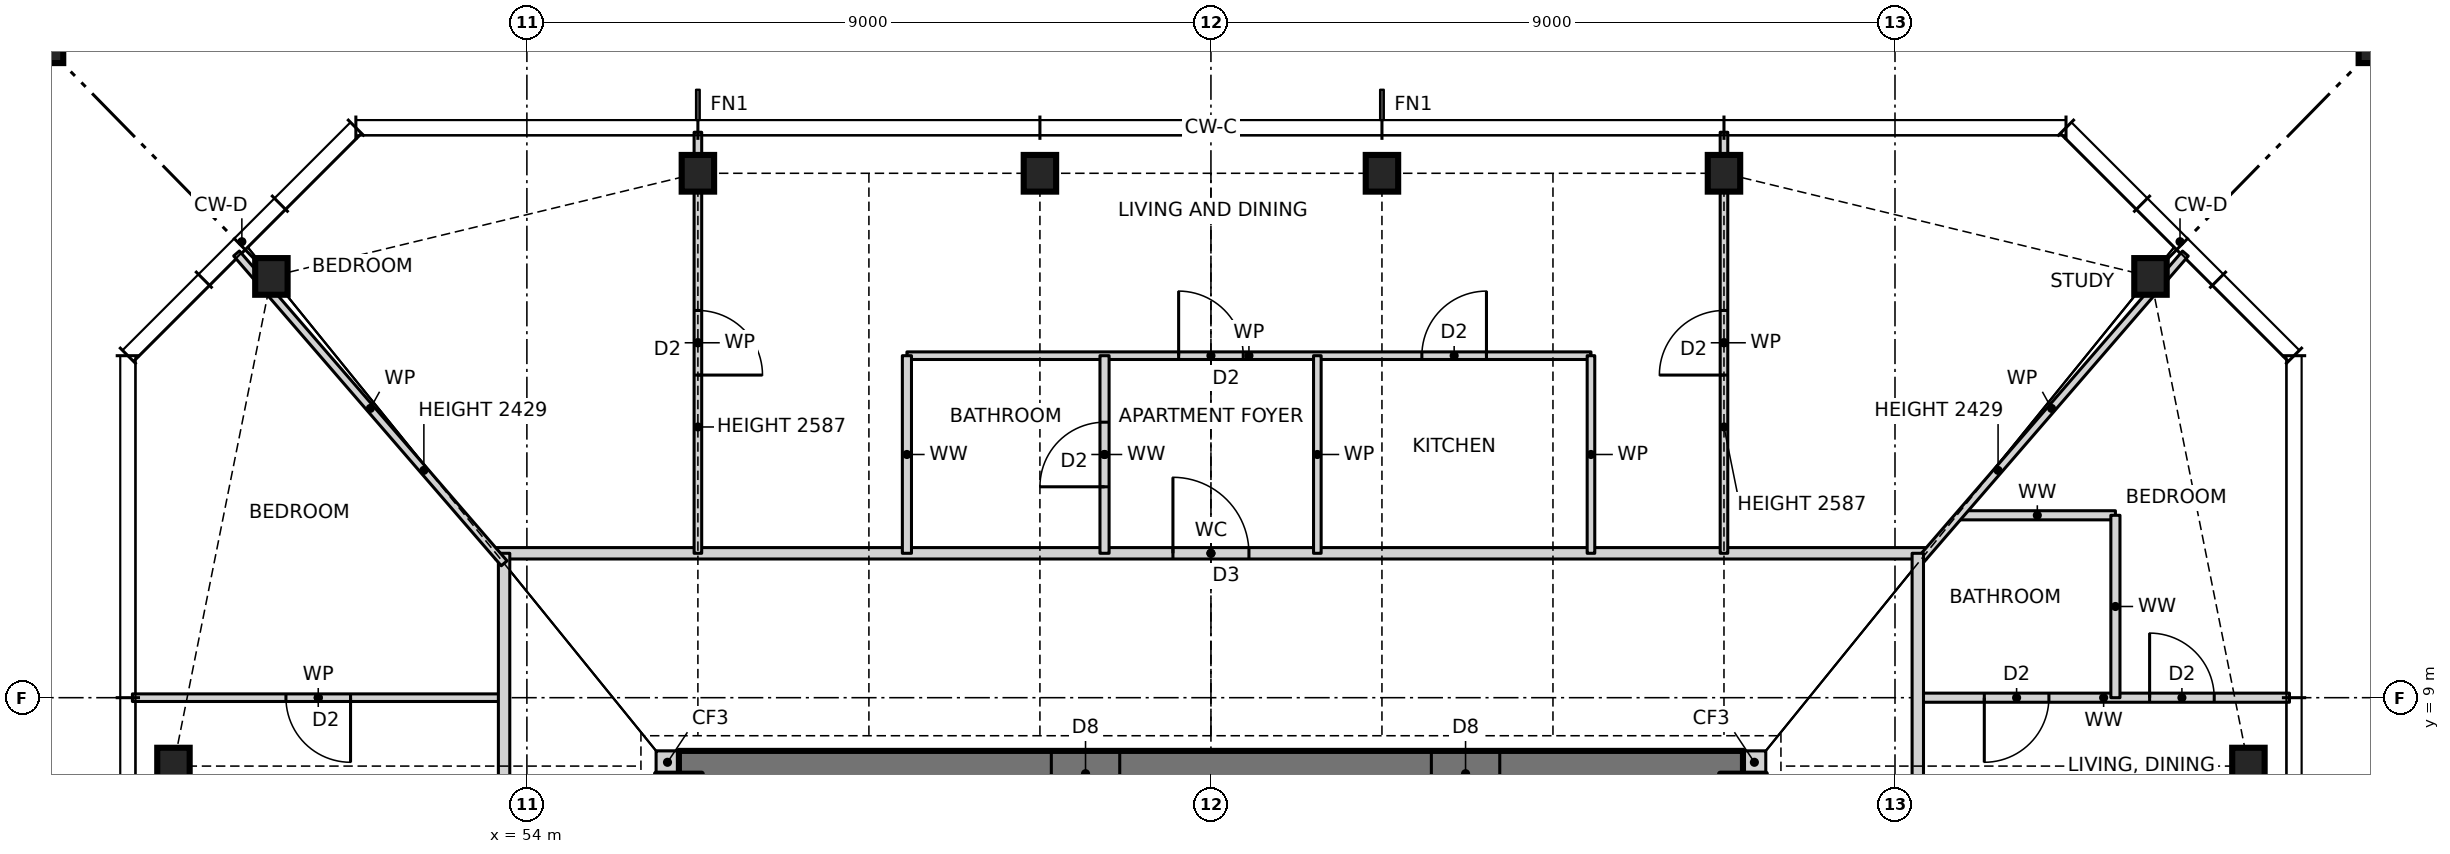
"""IFC4 building model, lengths in metres.
Left out: names, types, materials, properties, quantities, classifications, styles, units other than length and angle.
Written with IfcOpenShell. Run it as: python <this file> out.ifc"""

import sys

from ifc_helpers import new_model, si_unit, direction, frame, frame_2d, origin, origin_2d, place, context, subcontext, project, spatial, rectangle, hollow_rectangle, i_section, extrude, element, fill, save


model = new_model("IFC4")
c1 = context("Model", 3, precision=1e-05, world=origin(), true_north=direction((0.0, 1.0)))
c2 = subcontext(c1, "Body", "Model", "MODEL_VIEW")
j1 = project(units=[si_unit("LENGTHUNIT", "METRE"), si_unit("PLANEANGLEUNIT", "RADIAN")], contexts=[c1])
p1 = place(None, origin())
s1 = spatial("IfcSite", under=j1, at=p1, CompositionType="ELEMENT")
p2 = place(p1, origin())
s2 = spatial("IfcBuilding", under=s1, at=p2, CompositionType="ELEMENT")
p3 = place(p2, frame((0.0, 0.0, 105.0)))
s3 = spatial("IfcBuildingStorey", under=s2, at=p3, CompositionType="ELEMENT", Elevation=105.0)
for number, where, z_axis, x_axis in (
    (1, (76.65, 8.1, 0.0), (0.0, 0.0, 1.0), (1.0, 0.0, 0.0)),
    (2, (75.361, 14.543, 0.0), (0.0, 0.0, 1.0), (1.0, 0.0, 0.0)),
    (3, (69.75, 15.9, 0.0), (0.0, 0.0, 1.0), (1.0, 0.0, 0.0)),
    (4, (65.25, 15.9, 0.0), (0.0, 0.0, 1.0), (1.0, 0.0, 0.0)),
    (5, (60.75, 15.9, 0.0), (0.0, 0.0, 1.0), (1.0, 0.0, 0.0)),
    (6, (56.25, 15.9, 0.0), (0.0, 0.0, 1.0), (1.0, 0.0, 0.0)),
    (7, (50.639, 14.543, 0.0), (0.0, 0.0, 1.0), (1.0, 0.0, 0.0)),
    (8, (49.35, 8.1, 0.0), (0.0, 0.0, 1.0), (1.0, 0.0, 0.0)),
):
    element("IfcColumn", number, at=place(p3, frame(where, z_axis=z_axis, x_axis=x_axis)), inside=s3, PredefinedType="COLUMN", context=c2, shape_type="SweptSolid", body=[
        extrude(i_section(OverallWidth=0.427, OverallDepth=0.483, WebThickness=0.051, FlangeThickness=0.082, at=origin_2d()), origin(), (0.0, 0.0, 1.0), 3.5),
    ])
for number, where, z_axis, x_axis in (
    (9, (78.65, 17.9, 0.0), (0.0, 0.0, 1.0), (1.0, 0.0, 0.0)),
    (10, (47.35, 17.9, 0.0), (0.0, 0.0, 1.0), (1.0, 0.0, 0.0)),
):
    element("IfcColumn", number, at=place(p3, frame(where, z_axis=z_axis, x_axis=x_axis)), inside=s3, PredefinedType="COLUMN", context=c2, shape_type="SweptSolid", body=[
        extrude(hollow_rectangle(XDim=1.1, YDim=1.1, WallThickness=0.06, at=origin_2d()), origin(), (0.0, 0.0, 1.0), 3.5),
    ])
for number, where, z_axis, x_axis in (
    (11, (70.0, 8.15, 0.0), (0.0, 0.0, 1.0), (1.0, 0.0, 0.0)),
    (12, (55.7, 8.15, 0.0), (0.0, 0.0, 1.0), (1.0, 0.0, 0.0)),
):
    element("IfcWall", number, at=place(p3, frame(where, z_axis=z_axis, x_axis=x_axis)), inside=s3, PredefinedType="SOLIDWALL", context=c2, shape_type="SweptSolid", body=[
        extrude(rectangle(XDim=0.3, YDim=0.3, at=frame_2d((0.15, 0.0))), origin(), (0.0, 0.0, 1.0), 3.5),
    ])
p4 = place(p3, frame((70.0, 8.0, 0.0), z_axis=(0.0, 0.0, 1.0), x_axis=(-1.0, 0.0, 0.0)))
e13 = element("IfcWall", 13, at=p4, inside=s3, PredefinedType="SHEAR", context=c2, shape_type="SweptSolid", body=[
    extrude(rectangle(XDim=14.0, YDim=0.6, at=frame_2d((7.0, 0.0))), origin(), (0.0, 0.0, 1.0), 3.5),
])
p5 = place(p4, frame((8.2, 0.0, 0.0)))
e14 = element("IfcOpeningElement", 14, at=p5, cuts=e13, PredefinedType="OPENING", context=c2, shape_type="SweptSolid", body=[
    extrude(rectangle(XDim=0.9, YDim=2.1, at=frame_2d((0.45, 1.05))), frame((0.0, 0.31, 0.0), z_axis=(0.0, -1.0, 0.0), x_axis=(1.0, 0.0, 0.0)), (0.0, 0.0, 1.0), 0.62),
])
p6 = place(p4, frame((3.2, 0.0, 0.0)))
e15 = element("IfcOpeningElement", 15, at=p6, cuts=e13, PredefinedType="OPENING", context=c2, shape_type="SweptSolid", body=[
    extrude(rectangle(XDim=0.9, YDim=2.1, at=frame_2d((0.45, 1.05))), frame((0.0, 0.31, 0.0), z_axis=(0.0, -1.0, 0.0), x_axis=(1.0, 0.0, 0.0)), (0.0, 0.0, 1.0), 0.62),
])
p7 = place(p3, frame((48.81, 9.0, 0.0), z_axis=(0.0, 0.0, 1.0), x_axis=(1.0, 0.0, 0.0)))
e16 = element("IfcWall", 16, at=p7, inside=s3, PredefinedType="PARTITIONING", context=c2, shape_type="SweptSolid", body=[
    extrude(rectangle(XDim=4.89, YDim=0.1, at=frame_2d((2.445, 0.0))), origin(), (0.0, 0.0, 1.0), 3.27),
])
p8 = place(p7, frame((2.02, 0.0, 0.0)))
e17 = element("IfcOpeningElement", 17, at=p8, cuts=e16, PredefinedType="OPENING", context=c2, shape_type="SweptSolid", body=[
    extrude(rectangle(XDim=0.85, YDim=2.1, at=frame_2d((0.425, 1.05))), frame((0.0, 0.06, 0.0), z_axis=(0.0, -1.0, 0.0), x_axis=(1.0, 0.0, 0.0)), (0.0, 0.0, 1.0), 0.12),
])
p9 = place(p3, frame((72.3, 9.0, 0.0), z_axis=(0.0, 0.0, 1.0), x_axis=(1.0, 0.0, 0.0)))
e18 = element("IfcWall", 18, at=p9, inside=s3, PredefinedType="PARTITIONING", context=c2, shape_type="SweptSolid", body=[
    extrude(rectangle(XDim=4.89, YDim=0.12, at=frame_2d((2.445, 0.0))), origin(), (0.0, 0.0, 1.0), 3.27),
])
p10 = place(p9, frame((0.875, 0.0, 0.0)))
e19 = element("IfcOpeningElement", 19, at=p10, cuts=e18, PredefinedType="OPENING", context=c2, shape_type="SweptSolid", body=[
    extrude(rectangle(XDim=0.85, YDim=2.1, at=frame_2d((0.425, 1.05))), frame((0.0, 0.07, 0.0), z_axis=(0.0, -1.0, 0.0), x_axis=(1.0, 0.0, 0.0)), (0.0, 0.0, 1.0), 0.14),
])
p11 = place(p9, frame((3.05, 0.0, 0.0)))
e20 = element("IfcOpeningElement", 20, at=p11, cuts=e18, PredefinedType="OPENING", context=c2, shape_type="SweptSolid", body=[
    extrude(rectangle(XDim=0.85, YDim=2.1, at=frame_2d((0.425, 1.05))), frame((0.0, 0.07, 0.0), z_axis=(0.0, -1.0, 0.0), x_axis=(1.0, 0.0, 0.0)), (0.0, 0.0, 1.0), 0.14),
])
p12 = place(p3, frame((53.586, 10.9, 0.0), z_axis=(0.0, 0.0, 1.0), x_axis=(1.0, 0.0, 0.0)))
e21 = element("IfcWall", 21, at=p12, inside=s3, PredefinedType="PARTITIONING", context=c2, shape_type="SweptSolid", body=[
    extrude(rectangle(XDim=18.828, YDim=0.15, at=frame_2d((9.414, 0.0))), origin(), (0.0, 0.0, 1.0), 3.27),
])
p13 = place(p12, frame((8.914, 0.0, 0.0)))
e22 = element("IfcOpeningElement", 22, at=p13, cuts=e21, PredefinedType="OPENING", context=c2, shape_type="SweptSolid", body=[
    extrude(rectangle(XDim=1.0, YDim=2.1, at=frame_2d((0.5, 1.05))), frame((0.0, 0.085, 0.0), z_axis=(0.0, -1.0, 0.0), x_axis=(1.0, 0.0, 0.0)), (0.0, 0.0, 1.0), 0.17),
])
p14 = place(p3, frame((72.845, 11.4, 0.0), z_axis=(0.0, 0.0, 1.0), x_axis=(1.0, 0.0, 0.0)))
e23 = element("IfcWall", 23, at=p14, inside=s3, PredefinedType="PARTITIONING", context=c2, shape_type="SweptSolid", body=[
    extrude(rectangle(XDim=2.055, YDim=0.12, at=frame_2d((1.027, 0.0))), origin(), (0.0, 0.0, 1.0), 3.27),
])
p15 = place(p3, frame((59.0, 13.5, 0.0), z_axis=(0.0, 0.0, 1.0), x_axis=(1.0, 0.0, 0.0)))
e24 = element("IfcWall", 24, at=p15, inside=s3, PredefinedType="PARTITIONING", context=c2, shape_type="SweptSolid", body=[
    extrude(rectangle(XDim=9.0, YDim=0.1, at=frame_2d((4.5, 0.0))), origin(), (0.0, 0.0, 1.0), 3.27),
])
p16 = place(p15, frame((6.775, 0.0, 0.0)))
e25 = element("IfcOpeningElement", 25, at=p16, cuts=e24, PredefinedType="OPENING", context=c2, shape_type="SweptSolid", body=[
    extrude(rectangle(XDim=0.85, YDim=2.1, at=frame_2d((0.425, 1.05))), frame((0.0, 0.06, 0.0), z_axis=(0.0, -1.0, 0.0), x_axis=(1.0, 0.0, 0.0)), (0.0, 0.0, 1.0), 0.12),
])
p17 = place(p15, frame((3.575, 0.0, 0.0)))
e26 = element("IfcOpeningElement", 26, at=p17, cuts=e24, PredefinedType="OPENING", context=c2, shape_type="SweptSolid", body=[
    extrude(rectangle(XDim=0.85, YDim=2.1, at=frame_2d((0.425, 1.05))), frame((0.0, 0.06, 0.0), z_axis=(0.0, -1.0, 0.0), x_axis=(1.0, 0.0, 0.0)), (0.0, 0.0, 1.0), 0.12),
])
p18 = place(p3, frame((72.3, 10.768, 0.0), z_axis=(0.0, 0.0, 1.0), x_axis=(0.653709560919, 0.756745538449, 0.0)))
e27 = element("IfcWall", 27, at=p18, inside=s3, PredefinedType="PARTITIONING", context=c2, shape_type="SweptSolid", body=[
    extrude(rectangle(XDim=5.386, YDim=0.1, at=frame_2d((2.693, 0.0))), origin(), (0.0, 0.0, 1.0), 2.429),
])
p19 = place(p3, frame((74.9, 9.0, 0.0), z_axis=(0.0, 0.0, 1.0), x_axis=(0.0, 1.0, 0.0)))
e28 = element("IfcWall", 28, at=p19, inside=s3, PredefinedType="PARTITIONING", context=c2, shape_type="SweptSolid", body=[
    extrude(rectangle(XDim=2.4, YDim=0.12, at=frame_2d((1.2, 0.0))), origin(), (0.0, 0.0, 1.0), 3.27),
])
p20 = place(p3, frame((72.3, -10.768, 0.0), z_axis=(0.0, 0.0, 1.0), x_axis=(0.0, 1.0, 0.0)))
e29 = element("IfcWall", 29, at=p20, inside=s3, PredefinedType="PARTITIONING", context=c2, shape_type="SweptSolid", body=[
    extrude(rectangle(XDim=21.668, YDim=0.15, at=frame_2d((10.834, 0.0))), origin(), (0.0, 0.0, 1.0), 3.27),
])
p21 = place(p20, frame((6.268, 0.0, 0.0)))
e30 = element("IfcOpeningElement", 30, at=p21, cuts=e29, PredefinedType="OPENING", context=c2, shape_type="SweptSolid", body=[
    extrude(rectangle(XDim=1.0, YDim=2.1, at=frame_2d((0.5, 1.05))), frame((0.0, 0.085, 0.0), z_axis=(0.0, -1.0, 0.0), x_axis=(1.0, 0.0, 0.0)), (0.0, 0.0, 1.0), 0.17),
])
p22 = place(p20, frame((16.168, 0.0, 0.0)))
e31 = element("IfcOpeningElement", 31, at=p22, cuts=e29, PredefinedType="OPENING", context=c2, shape_type="SweptSolid", body=[
    extrude(rectangle(XDim=1.0, YDim=2.1, at=frame_2d((0.5, 1.05))), frame((0.0, 0.085, 0.0), z_axis=(0.0, -1.0, 0.0), x_axis=(1.0, 0.0, 0.0)), (0.0, 0.0, 1.0), 0.17),
])
p23 = place(p3, frame((69.75, 10.9, 0.0), z_axis=(0.0, 0.0, 1.0), x_axis=(0.0, 1.0, 0.0)))
e32 = element("IfcWall", 32, at=p23, inside=s3, PredefinedType="PARTITIONING", context=c2, shape_type="SweptSolid", body=[
    extrude(rectangle(XDim=5.54, YDim=0.1, at=frame_2d((2.77, 0.0))), origin(), (0.0, 0.0, 1.0), 2.587),
])
p24 = place(p23, frame((2.345, 0.0, 0.0)))
e33 = element("IfcOpeningElement", 33, at=p24, cuts=e32, PredefinedType="OPENING", context=c2, shape_type="SweptSolid", body=[
    extrude(rectangle(XDim=0.85, YDim=2.1, at=frame_2d((0.425, 1.05))), frame((0.0, 0.06, 0.0), z_axis=(0.0, -1.0, 0.0), x_axis=(1.0, 0.0, 0.0)), (0.0, 0.0, 1.0), 0.12),
])
for number, where, z_axis, x_axis in (
    (34, (68.0, 10.9, 0.0), (0.0, 0.0, 1.0), (0.0, 1.0, 0.0)),
    (35, (64.4, 10.9, 0.0), (0.0, 0.0, 1.0), (0.0, 1.0, 0.0)),
):
    element("IfcWall", number, at=place(p3, frame(where, z_axis=z_axis, x_axis=x_axis)), inside=s3, PredefinedType="PARTITIONING", context=c2, shape_type="SweptSolid", body=[
        extrude(rectangle(XDim=2.6, YDim=0.1, at=frame_2d((1.3, 0.0))), origin(), (0.0, 0.0, 1.0), 3.27),
    ])
p25 = place(p3, frame((61.6, 10.9, 0.0), z_axis=(0.0, 0.0, 1.0), x_axis=(0.0, 1.0, 0.0)))
e36 = element("IfcWall", 36, at=p25, inside=s3, PredefinedType="PARTITIONING", context=c2, shape_type="SweptSolid", body=[
    extrude(rectangle(XDim=2.6, YDim=0.12, at=frame_2d((1.3, 0.0))), origin(), (0.0, 0.0, 1.0), 3.27),
])
p26 = place(p25, frame((0.875, 0.0, 0.0)))
e37 = element("IfcOpeningElement", 37, at=p26, cuts=e36, PredefinedType="OPENING", context=c2, shape_type="SweptSolid", body=[
    extrude(rectangle(XDim=0.85, YDim=2.1, at=frame_2d((0.425, 1.05))), frame((0.0, 0.07, 0.0), z_axis=(0.0, -1.0, 0.0), x_axis=(1.0, 0.0, 0.0)), (0.0, 0.0, 1.0), 0.14),
])
p27 = place(p3, frame((59.0, 10.9, 0.0), z_axis=(0.0, 0.0, 1.0), x_axis=(0.0, 1.0, 0.0)))
e38 = element("IfcWall", 38, at=p27, inside=s3, PredefinedType="PARTITIONING", context=c2, shape_type="SweptSolid", body=[
    extrude(rectangle(XDim=2.6, YDim=0.12, at=frame_2d((1.3, 0.0))), origin(), (0.0, 0.0, 1.0), 3.27),
])
p28 = place(p3, frame((56.25, 10.9, 0.0), z_axis=(0.0, 0.0, 1.0), x_axis=(0.0, 1.0, 0.0)))
e39 = element("IfcWall", 39, at=p28, inside=s3, PredefinedType="PARTITIONING", context=c2, shape_type="SweptSolid", body=[
    extrude(rectangle(XDim=5.54, YDim=0.1, at=frame_2d((2.77, 0.0))), origin(), (0.0, 0.0, 1.0), 2.587),
])
p29 = place(p28, frame((2.345, 0.0, 0.0)))
e40 = element("IfcOpeningElement", 40, at=p29, cuts=e39, PredefinedType="OPENING", context=c2, shape_type="SweptSolid", body=[
    extrude(rectangle(XDim=0.85, YDim=2.1, at=frame_2d((0.425, 1.05))), frame((0.0, 0.06, 0.0), z_axis=(0.0, -1.0, 0.0), x_axis=(1.0, 0.0, 0.0)), (0.0, 0.0, 1.0), 0.12),
])
p30 = place(p3, frame((53.7, -10.768, 0.0), z_axis=(0.0, 0.0, 1.0), x_axis=(0.0, 1.0, 0.0)))
e41 = element("IfcWall", 41, at=p30, inside=s3, PredefinedType="PARTITIONING", context=c2, shape_type="SweptSolid", body=[
    extrude(rectangle(XDim=21.668, YDim=0.15, at=frame_2d((10.834, 0.0))), origin(), (0.0, 0.0, 1.0), 3.27),
])
p31 = place(p30, frame((10.268, 0.0, 0.0)))
e42 = element("IfcOpeningElement", 42, at=p31, cuts=e41, PredefinedType="OPENING", context=c2, shape_type="SweptSolid", body=[
    extrude(rectangle(XDim=1.0, YDim=2.1, at=frame_2d((0.5, 1.05))), frame((0.0, 0.085, 0.0), z_axis=(0.0, -1.0, 0.0), x_axis=(1.0, 0.0, 0.0)), (0.0, 0.0, 1.0), 0.17),
])
p32 = place(p3, frame((53.701, 10.768, 0.0), z_axis=(0.0, 0.0, 1.0), x_axis=(-0.653623410225, 0.756819950586, 0.0)))
e43 = element("IfcWall", 43, at=p32, inside=s3, PredefinedType="PARTITIONING", context=c2, shape_type="SweptSolid", body=[
    extrude(rectangle(XDim=5.387, YDim=0.1, at=frame_2d((2.693, 0.0))), origin(), (0.0, 0.0, 1.0), 2.429),
])
p33 = place(p10, frame((0.85, 0.0, 0.0), z_axis=(0.0, 0.0, 1.0), x_axis=(-1.0, 0.0, 0.0)))
e44 = element("IfcDoor", 44, at=p33, inside=s3, OperationType="SINGLE_SWING_RIGHT", PredefinedType="DOOR", context=c2, shape_type="SweptSolid", body=[
    extrude(rectangle(XDim=0.85, YDim=2.1, at=frame_2d((0.425, 1.05))), frame((0.0, 0.025, 0.0), z_axis=(0.0, -1.0, 0.0), x_axis=(1.0, 0.0, 0.0)), (0.0, 0.0, 1.0), 0.05),
])
fill(e19, e44)
p34 = place(p11, origin())
e45 = element("IfcDoor", 45, at=p34, inside=s3, OperationType="SINGLE_SWING_LEFT", PredefinedType="DOOR", context=c2, shape_type="SweptSolid", body=[
    extrude(rectangle(XDim=0.85, YDim=2.1, at=frame_2d((0.425, 1.05))), frame((0.0, 0.025, 0.0), z_axis=(0.0, -1.0, 0.0), x_axis=(1.0, 0.0, 0.0)), (0.0, 0.0, 1.0), 0.05),
])
fill(e20, e45)
p35 = place(p16, origin())
e46 = element("IfcDoor", 46, at=p35, inside=s3, OperationType="SINGLE_SWING_RIGHT", PredefinedType="DOOR", context=c2, shape_type="SweptSolid", body=[
    extrude(rectangle(XDim=0.85, YDim=2.1, at=frame_2d((0.425, 1.05))), frame((0.0, 0.025, 0.0), z_axis=(0.0, -1.0, 0.0), x_axis=(1.0, 0.0, 0.0)), (0.0, 0.0, 1.0), 0.05),
])
fill(e25, e46)
p36 = place(p13, origin())
e47 = element("IfcDoor", 47, at=p36, inside=s3, OperationType="SINGLE_SWING_LEFT", PredefinedType="DOOR", context=c2, shape_type="SweptSolid", body=[
    extrude(rectangle(XDim=1.0, YDim=2.1, at=frame_2d((0.5, 1.05))), frame((0.0, 0.025, 0.0), z_axis=(0.0, -1.0, 0.0), x_axis=(1.0, 0.0, 0.0)), (0.0, 0.0, 1.0), 0.05),
])
fill(e22, e47)
p37 = place(p17, origin())
e48 = element("IfcDoor", 48, at=p37, inside=s3, OperationType="SINGLE_SWING_LEFT", PredefinedType="DOOR", context=c2, shape_type="SweptSolid", body=[
    extrude(rectangle(XDim=0.85, YDim=2.1, at=frame_2d((0.425, 1.05))), frame((0.0, 0.025, 0.0), z_axis=(0.0, -1.0, 0.0), x_axis=(1.0, 0.0, 0.0)), (0.0, 0.0, 1.0), 0.05),
])
fill(e26, e48)
p38 = place(p26, origin())
e49 = element("IfcDoor", 49, at=p38, inside=s3, OperationType="SINGLE_SWING_LEFT", PredefinedType="DOOR", context=c2, shape_type="SweptSolid", body=[
    extrude(rectangle(XDim=0.85, YDim=2.1, at=frame_2d((0.425, 1.05))), frame((0.0, 0.025, 0.0), z_axis=(0.0, -1.0, 0.0), x_axis=(1.0, 0.0, 0.0)), (0.0, 0.0, 1.0), 0.05),
])
fill(e37, e49)
p39 = place(p24, origin())
e50 = element("IfcDoor", 50, at=p39, inside=s3, OperationType="SINGLE_SWING_LEFT", PredefinedType="DOOR", context=c2, shape_type="SweptSolid", body=[
    extrude(rectangle(XDim=0.85, YDim=2.1, at=frame_2d((0.425, 1.05))), frame((0.0, 0.025, 0.0), z_axis=(0.0, -1.0, 0.0), x_axis=(1.0, 0.0, 0.0)), (0.0, 0.0, 1.0), 0.05),
])
fill(e33, e50)
p40 = place(p29, frame((0.85, 0.0, 0.0), z_axis=(0.0, 0.0, 1.0), x_axis=(-1.0, 0.0, 0.0)))
e51 = element("IfcDoor", 51, at=p40, inside=s3, OperationType="SINGLE_SWING_RIGHT", PredefinedType="DOOR", context=c2, shape_type="SweptSolid", body=[
    extrude(rectangle(XDim=0.85, YDim=2.1, at=frame_2d((0.425, 1.05))), frame((0.0, 0.025, 0.0), z_axis=(0.0, -1.0, 0.0), x_axis=(1.0, 0.0, 0.0)), (0.0, 0.0, 1.0), 0.05),
])
fill(e40, e51)
p41 = place(p8, frame((0.85, 0.0, 0.0), z_axis=(0.0, 0.0, 1.0), x_axis=(-1.0, 0.0, 0.0)))
e52 = element("IfcDoor", 52, at=p41, inside=s3, OperationType="SINGLE_SWING_LEFT", PredefinedType="DOOR", context=c2, shape_type="SweptSolid", body=[
    extrude(rectangle(XDim=0.85, YDim=2.1, at=frame_2d((0.425, 1.05))), frame((0.0, 0.025, 0.0), z_axis=(0.0, -1.0, 0.0), x_axis=(1.0, 0.0, 0.0)), (0.0, 0.0, 1.0), 0.05),
])
fill(e17, e52)
p42 = place(p5, origin())
e53 = element("IfcDoor", 53, at=p42, inside=s3, OperationType="SINGLE_SWING_RIGHT", PredefinedType="DOOR", context=c2, shape_type="SweptSolid", body=[
    extrude(rectangle(XDim=0.9, YDim=2.1, at=frame_2d((0.45, 1.05))), frame((0.0, 0.025, 0.0), z_axis=(0.0, -1.0, 0.0), x_axis=(1.0, 0.0, 0.0)), (0.0, 0.0, 1.0), 0.05),
])
fill(e14, e53)
p43 = place(p6, origin())
e54 = element("IfcDoor", 54, at=p43, inside=s3, OperationType="SINGLE_SWING_RIGHT", PredefinedType="DOOR", context=c2, shape_type="SweptSolid", body=[
    extrude(rectangle(XDim=0.9, YDim=2.1, at=frame_2d((0.45, 1.05))), frame((0.0, 0.025, 0.0), z_axis=(0.0, -1.0, 0.0), x_axis=(1.0, 0.0, 0.0)), (0.0, 0.0, 1.0), 0.05),
])
fill(e15, e54)
save(model, sys.argv[1])
